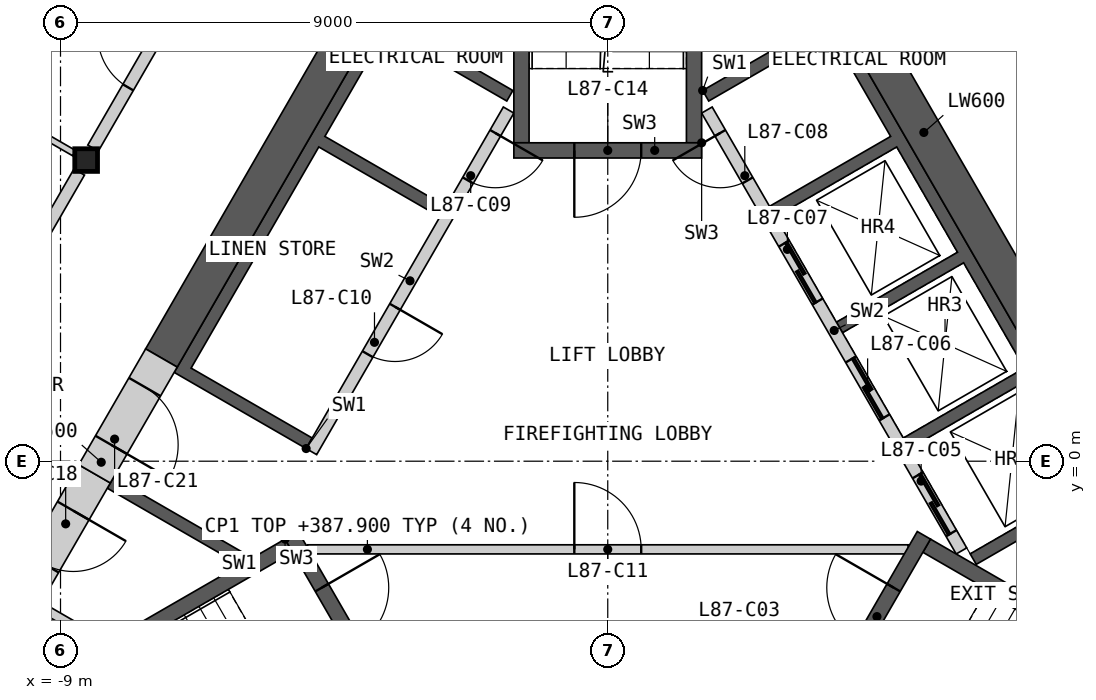
"""IFC4 building model, lengths in metres.
Left out: names, types, materials, properties, quantities, classifications, styles, units other than length and angle.
Written with IfcOpenShell. Run it as: python <this file> out.ifc"""

import sys

from ifc_helpers import new_model, si_unit, direction, frame, frame_2d, origin, origin_2d, place, context, subcontext, project, spatial, polyline, rectangle, i_section, outline, extrude, element, fill, save


model = new_model("IFC4")
c1 = context("Model", 3, precision=1e-05, world=origin(), true_north=direction((0.0, 1.0)))
c2 = subcontext(c1, "Body", "Model", "MODEL_VIEW")
j1 = project(units=[si_unit("LENGTHUNIT", "METRE"), si_unit("PLANEANGLEUNIT", "RADIAN")], contexts=[c1])
p1 = place(None, origin())
s1 = spatial("IfcSite", under=j1, at=p1, CompositionType="ELEMENT")
p2 = place(p1, origin())
s2 = spatial("IfcBuilding", under=s1, at=p2, CompositionType="ELEMENT")
p3 = place(p2, frame((0.0, 0.0, 384.8)))
s3 = spatial("IfcBuildingStorey", under=s2, at=p3, CompositionType="ELEMENT", Elevation=384.8)
p4 = place(p3, frame((-8.578, 4.953, 0.0), z_axis=(0.0, 0.0, 1.0), x_axis=(1.0, 0.0, 0.0)))
e1 = element("IfcColumn", 1, at=p4, inside=s3, PredefinedType="COLUMN", context=c2, shape_type="SweptSolid", body=[
    extrude(i_section(OverallWidth=0.374, OverallDepth=0.372, WebThickness=0.016, FlangeThickness=0.026, at=origin_2d()), origin(), (0.0, 0.0, 1.0), 3.4),
])
p5 = place(p3, origin())
e2 = element("IfcWall", 2, at=p5, inside=s3, PredefinedType="SHEAR", context=c2, shape_type="SweptSolid", body=[
    extrude(outline(polyline([(1.561, 6.097), (3.731, 7.35), (8.231, -0.444), (6.061, -1.697), (5.96, -1.524), (7.952, -0.374), (6.952, 1.358), (4.96, 0.208), (4.861, 0.381), (6.852, 1.531), (5.852, 3.263), (3.861, 2.113), (3.76, 2.287), (5.752, 3.437), (4.752, 5.169), (2.76, 4.019), (2.66, 4.192), (4.652, 5.342), (3.652, 7.074), (1.66, 5.924), (1.561, 6.097)])), origin(), (0.0, 0.0, 1.0), 3.1),
])
p6 = place(p3, frame((5.817, -1.476, 0.0), z_axis=(0.0, 0.0, 1.0), x_axis=(-0.500002616675, 0.866023893041, 0.0)))
e3 = element("IfcWall", 3, at=p6, inside=s3, PredefinedType="SOLIDWALL", context=c2, shape_type="SweptSolid", body=[
    extrude(rectangle(XDim=8.373, YDim=0.2, at=frame_2d((4.187, 0.0))), origin(), (0.0, 0.0, 1.0), 3.1),
])
p7 = place(p6, frame((0.337, 0.0, 0.0)))
e4 = element("IfcOpeningElement", 4, at=p7, cuts=e3, PredefinedType="OPENING", context=c2, shape_type="SweptSolid", body=[
    extrude(rectangle(XDim=1.1, YDim=2.1, at=frame_2d((0.55, 1.05))), frame((0.0, 0.11, 0.0), z_axis=(0.0, -1.0, 0.0), x_axis=(1.0, 0.0, 0.0)), (0.0, 0.0, 1.0), 0.22),
])
p8 = place(p6, frame((2.537, 0.0, 0.0)))
e5 = element("IfcOpeningElement", 5, at=p8, cuts=e3, PredefinedType="OPENING", context=c2, shape_type="SweptSolid", body=[
    extrude(rectangle(XDim=1.1, YDim=2.1, at=frame_2d((0.55, 1.05))), frame((0.0, 0.11, 0.0), z_axis=(0.0, -1.0, 0.0), x_axis=(1.0, 0.0, 0.0)), (0.0, 0.0, 1.0), 0.22),
])
p9 = place(p6, frame((4.737, 0.0, 0.0)))
e6 = element("IfcOpeningElement", 6, at=p9, cuts=e3, PredefinedType="OPENING", context=c2, shape_type="SweptSolid", body=[
    extrude(rectangle(XDim=1.1, YDim=2.1, at=frame_2d((0.55, 1.05))), frame((0.0, 0.11, 0.0), z_axis=(0.0, -1.0, 0.0), x_axis=(1.0, 0.0, 0.0)), (0.0, 0.0, 1.0), 0.22),
])
p10 = place(p6, frame((7.037, 0.0, 0.0)))
e7 = element("IfcOpeningElement", 7, at=p10, cuts=e3, PredefinedType="OPENING", context=c2, shape_type="SweptSolid", body=[
    extrude(rectangle(XDim=0.9, YDim=2.1, at=frame_2d((0.45, 1.05))), frame((0.0, 0.11, 0.0), z_axis=(0.0, -1.0, 0.0), x_axis=(1.0, 0.0, 0.0)), (0.0, 0.0, 1.0), 0.22),
])
p11 = place(p3, origin())
e8 = element("IfcWall", 8, at=p11, inside=s3, PredefinedType="SHEAR", context=c2, shape_type="SweptSolid", body=[
    extrude(outline(polyline([(-6.061, -1.697), (-8.231, -0.444), (-8.131, -0.271), (-5.96, -1.524), (-6.061, -1.697)])), origin(), (0.0, 0.0, 1.0), 3.1),
])
p12 = place(p3, origin())
e9 = element("IfcWall", 9, at=p12, inside=s3, PredefinedType="SHEAR", context=c2, shape_type="SweptSolid", body=[
    extrude(outline(polyline([(-4.96, 0.208), (-7.131, 1.461), (-3.731, 7.35), (-1.561, 6.097), (-1.66, 5.924), (-3.652, 7.074), (-4.652, 5.342), (-2.66, 4.192), (-2.76, 4.019), (-4.752, 5.169), (-6.852, 1.531), (-4.861, 0.381), (-4.96, 0.208)])), origin(), (0.0, 0.0, 1.0), 3.1),
])
p13 = place(p3, frame((-1.631, 5.776, 0.0), z_axis=(0.0, 0.0, 1.0), x_axis=(-0.499992876559, -0.866029516466, 0.0)))
e10 = element("IfcWall", 10, at=p13, inside=s3, PredefinedType="SOLIDWALL", context=c2, shape_type="SweptSolid", body=[
    extrude(rectangle(XDim=6.486, YDim=0.2, at=frame_2d((3.243, 0.0))), origin(), (0.0, 0.0, 1.0), 3.1),
])
p14 = place(p13, frame((0.437, 0.0, 0.0)))
e11 = element("IfcOpeningElement", 11, at=p14, cuts=e10, PredefinedType="OPENING", context=c2, shape_type="SweptSolid", body=[
    extrude(rectangle(XDim=0.9, YDim=2.1, at=frame_2d((0.45, 1.05))), frame((0.0, 0.11, 0.0), z_axis=(0.0, -1.0, 0.0), x_axis=(1.0, 0.0, 0.0)), (0.0, 0.0, 1.0), 0.22),
])
p15 = place(p13, frame((3.737, 0.0, 0.0)))
e12 = element("IfcOpeningElement", 12, at=p15, cuts=e10, PredefinedType="OPENING", context=c2, shape_type="SweptSolid", body=[
    extrude(rectangle(XDim=0.9, YDim=2.1, at=frame_2d((0.45, 1.05))), frame((0.0, 0.11, 0.0), z_axis=(0.0, -1.0, 0.0), x_axis=(1.0, 0.0, 0.0)), (0.0, 0.0, 1.0), 0.22),
])
p16 = place(p3, frame((-4.941, -1.45, 0.0), z_axis=(0.0, 0.0, 1.0), x_axis=(1.0, 0.0, 0.0)))
e13 = element("IfcWall", 13, at=p16, inside=s3, PredefinedType="PARTITIONING", context=c2, shape_type="SweptSolid", body=[
    extrude(rectangle(XDim=9.882, YDim=0.15, at=frame_2d((4.941, 0.0))), origin(), (0.0, 0.0, 1.0), 3.1),
])
p17 = place(p16, frame((4.391, 0.0, 0.0)))
e14 = element("IfcOpeningElement", 14, at=p17, cuts=e13, PredefinedType="OPENING", context=c2, shape_type="SweptSolid", body=[
    extrude(rectangle(XDim=1.1, YDim=2.1, at=frame_2d((0.55, 1.05))), frame((0.0, 0.085, 0.0), z_axis=(0.0, -1.0, 0.0), x_axis=(1.0, 0.0, 0.0)), (0.0, 0.0, 1.0), 0.17),
])
p18 = place(p3, origin())
e15 = element("IfcWall", 15, at=p18, inside=s3, PredefinedType="SHEAR", context=c2, shape_type="SweptSolid", body=[
    extrude(outline(polyline([(-5.307, -1.281), (-10.374, -4.206), (-10.032, -4.298), (-5.182, -1.498), (-5.307, -1.281)])), origin(), (0.0, 0.0, 1.0), 3.1),
])
p19 = place(p3, frame((-5.199, -1.219, 0.0), z_axis=(0.0, 0.0, 1.0), x_axis=(0.499982516597, -0.866035497597, 0.0)))
e16 = element("IfcWall", 16, at=p19, inside=s3, PredefinedType="SHEAR", context=c2, shape_type="SweptSolid", body=[
    extrude(rectangle(XDim=3.088, YDim=0.25, at=frame_2d((1.544, 0.0))), origin(), (0.0, 0.0, 1.0), 3.1),
])
p20 = place(p19, frame((0.994, 0.0, 0.0)))
e17 = element("IfcOpeningElement", 17, at=p20, cuts=e16, PredefinedType="OPENING", context=c2, shape_type="SweptSolid", body=[
    extrude(rectangle(XDim=1.1, YDim=2.1, at=frame_2d((0.55, 1.05))), frame((0.0, 0.135, 0.0), z_axis=(0.0, -1.0, 0.0), x_axis=(1.0, 0.0, 0.0)), (0.0, 0.0, 1.0), 0.27),
])
p21 = place(p3, origin())
e18 = element("IfcWall", 18, at=p21, inside=s3, PredefinedType="SHEAR", context=c2, shape_type="SweptSolid", body=[
    extrude(outline(polyline([(10.032, -4.298), (10.374, -4.206), (5.307, -1.281), (5.182, -1.498), (10.032, -4.298)])), origin(), (0.0, 0.0, 1.0), 3.1),
])
p22 = place(p3, frame((3.655, -3.893, 0.0), z_axis=(0.0, 0.0, 1.0), x_axis=(0.499982516597, 0.866035497597, 0.0)))
e19 = element("IfcWall", 19, at=p22, inside=s3, PredefinedType="SHEAR", context=c2, shape_type="SweptSolid", body=[
    extrude(rectangle(XDim=3.088, YDim=0.25, at=frame_2d((1.544, 0.0))), origin(), (0.0, 0.0, 1.0), 3.1),
])
p23 = place(p22, frame((0.994, 0.0, 0.0)))
e20 = element("IfcOpeningElement", 20, at=p23, cuts=e19, PredefinedType="OPENING", context=c2, shape_type="SweptSolid", body=[
    extrude(rectangle(XDim=1.1, YDim=2.1, at=frame_2d((0.55, 1.05))), frame((0.0, 0.135, 0.0), z_axis=(0.0, -1.0, 0.0), x_axis=(1.0, 0.0, 0.0)), (0.0, 0.0, 1.0), 0.27),
])
p24 = place(p3, origin())
e21 = element("IfcWall", 21, at=p24, inside=s3, PredefinedType="SHEAR", context=c2, shape_type="SweptSolid", body=[
    extrude(outline(polyline([(1.544, 5.237), (1.544, 11.087), (1.294, 10.837), (1.294, 5.237), (1.544, 5.237)])), origin(), (0.0, 0.0, 1.0), 3.1),
])
p25 = place(p3, origin())
e22 = element("IfcWall", 22, at=p25, inside=s3, PredefinedType="SHEAR", context=c2, shape_type="SweptSolid", body=[
    extrude(outline(polyline([(-1.294, 10.837), (-1.544, 11.087), (-1.544, 5.237), (-1.294, 5.237), (-1.294, 10.837)])), origin(), (0.0, 0.0, 1.0), 3.1),
])
p26 = place(p3, frame((1.544, 5.112, 0.0), z_axis=(0.0, 0.0, 1.0), x_axis=(-1.0, 0.0, 0.0)))
e23 = element("IfcWall", 23, at=p26, inside=s3, PredefinedType="SHEAR", context=c2, shape_type="SweptSolid", body=[
    extrude(rectangle(XDim=3.088, YDim=0.25, at=frame_2d((1.544, 0.0))), origin(), (0.0, 0.0, 1.0), 3.1),
])
p27 = place(p26, frame((0.994, 0.0, 0.0)))
e24 = element("IfcOpeningElement", 24, at=p27, cuts=e23, PredefinedType="OPENING", context=c2, shape_type="SweptSolid", body=[
    extrude(rectangle(XDim=1.1, YDim=2.1, at=frame_2d((0.55, 1.05))), frame((0.0, 0.135, 0.0), z_axis=(0.0, -1.0, 0.0), x_axis=(1.0, 0.0, 0.0)), (0.0, 0.0, 1.0), 0.27),
])
p28 = place(p3, frame((-9.35, -2.383, 0.0), z_axis=(0.0, 0.0, 1.0), x_axis=(0.866057962423, -0.499943602543, 0.0)))
e25 = element("IfcWall", 25, at=p28, inside=s3, PredefinedType="PARTITIONING", context=c2, shape_type="SweptSolid", body=[
    extrude(rectangle(XDim=1.242, YDim=0.15, at=frame_2d((0.621, 0.0))), origin(), (0.0, 0.0, 1.0), 3.1),
])
p29 = place(p3, frame((8.841, -0.902, 0.0), z_axis=(0.0, 0.0, 1.0), x_axis=(-0.499995618375, 0.866027933502, 0.0)))
e26 = element("IfcWall", 26, at=p29, inside=s3, PredefinedType="SHEAR", context=c2, shape_type="SweptSolid", body=[
    extrude(rectangle(XDim=14.571, YDim=0.6, at=frame_2d((7.285, 0.0))), origin(), (0.0, 0.0, 1.0), 3.1),
])
p30 = place(p3, frame((-3.639, 8.107, 0.0), z_axis=(0.0, 0.0, 1.0), x_axis=(-0.49999180351, -0.866030135978, 0.0)))
e27 = element("IfcWall", 27, at=p30, inside=s3, PredefinedType="SHEAR", context=c2, shape_type="SweptSolid", body=[
    extrude(rectangle(XDim=7.401, YDim=0.6, at=frame_2d((3.701, 0.0))), origin(), (0.0, 0.0, 1.0), 3.1),
])
p31 = place(p3, frame((-8.44, -0.208, 0.0), z_axis=(0.0, 0.0, 1.0), x_axis=(-0.500001951578, -0.866024277037, 0.0)))
e28 = element("IfcWall", 28, at=p31, inside=s3, PredefinedType="SHEAR", context=c2, shape_type="SweptSolid", body=[
    extrude(rectangle(XDim=2.243, YDim=0.6, at=frame_2d((1.122, 0.0))), origin(), (0.0, 0.0, 1.0), 3.1),
])
p32 = place(p31, frame((0.7, 0.0, 0.0)))
e29 = element("IfcOpeningElement", 29, at=p32, cuts=e28, PredefinedType="OPENING", context=c2, shape_type="SweptSolid", body=[
    extrude(rectangle(XDim=1.0, YDim=2.1, at=frame_2d((0.5, 1.05))), frame((0.0, 0.31, 0.0), z_axis=(0.0, -1.0, 0.0), x_axis=(1.0, 0.0, 0.0)), (0.0, 0.0, 1.0), 0.62),
])
p33 = place(p3, frame((-7.34, 1.698, 0.0), z_axis=(0.0, 0.0, 1.0), x_axis=(-0.50002983664, -0.866008176907, 0.0)))
e30 = element("IfcWall", 30, at=p33, inside=s3, PredefinedType="SHEAR", context=c2, shape_type="SweptSolid", body=[
    extrude(rectangle(XDim=2.2, YDim=0.6, at=frame_2d((1.1, 0.0))), origin(), (0.0, 0.0, 1.0), 3.1),
])
p34 = place(p33, frame((0.55, 0.0, 0.0)))
e31 = element("IfcOpeningElement", 31, at=p34, cuts=e30, PredefinedType="OPENING", context=c2, shape_type="SweptSolid", body=[
    extrude(rectangle(XDim=1.1, YDim=2.1, at=frame_2d((0.55, 1.05))), frame((0.0, 0.31, 0.0), z_axis=(0.0, -1.0, 0.0), x_axis=(1.0, 0.0, 0.0)), (0.0, 0.0, 1.0), 0.62),
])
p35 = place(p3, frame((4.403, 12.185, 0.0), z_axis=(0.0, 0.0, 1.0), x_axis=(0.499992155518, -0.866029932751, 0.0)))
e32 = element("IfcWall", 32, at=p35, inside=s3, PredefinedType="PARTITIONING", context=c2, shape_type="SweptSolid", body=[
    extrude(rectangle(XDim=8.123, YDim=0.2, at=frame_2d((4.062, 0.0))), origin(), (0.0, 0.0, 1.0), 3.1),
])
p36 = place(p35, frame((3.587, 0.0, 0.0)))
e33 = element("IfcOpeningElement", 33, at=p36, cuts=e32, PredefinedType="OPENING", context=c2, shape_type="SweptSolid", body=[
    extrude(rectangle(XDim=0.95, YDim=2.1, at=frame_2d((0.475, 1.05))), frame((0.0, 0.11, 0.0), z_axis=(0.0, -1.0, 0.0), x_axis=(1.0, 0.0, 0.0)), (0.0, 0.0, 1.0), 0.22),
])
p37 = place(p3, frame((-8.465, 5.15, 0.0), z_axis=(0.0, 0.0, 1.0), x_axis=(0.499992155518, 0.866029932751, 0.0)))
e34 = element("IfcWall", 34, at=p37, inside=s3, PredefinedType="PARTITIONING", context=c2, shape_type="SweptSolid", body=[
    extrude(rectangle(XDim=8.123, YDim=0.2, at=frame_2d((4.062, 0.0))), origin(), (0.0, 0.0, 1.0), 3.1),
])
p38 = place(p37, frame((1.153, 0.0, 0.0)))
e35 = element("IfcOpeningElement", 35, at=p38, cuts=e34, PredefinedType="OPENING", context=c2, shape_type="SweptSolid", body=[
    extrude(rectangle(XDim=1.0, YDim=2.1, at=frame_2d((0.5, 1.05))), frame((0.0, 0.11, 0.0), z_axis=(0.0, -1.0, 0.0), x_axis=(1.0, 0.0, 0.0)), (0.0, 0.0, 1.0), 0.22),
])
p39 = place(p3, frame((-12.754, -2.279, 0.0), z_axis=(0.0, 0.0, 1.0), x_axis=(0.500001682468, 0.866024432409, 0.0)))
e36 = element("IfcWall", 36, at=p39, inside=s3, PredefinedType="PARTITIONING", context=c2, shape_type="SweptSolid", body=[
    extrude(rectangle(XDim=8.124, YDim=0.2, at=frame_2d((4.062, 0.0))), origin(), (0.0, 0.0, 1.0), 3.1),
])
p40 = place(p39, frame((1.153, 0.0, 0.0)))
e37 = element("IfcOpeningElement", 37, at=p40, cuts=e36, PredefinedType="OPENING", context=c2, shape_type="SweptSolid", body=[
    extrude(rectangle(XDim=1.0, YDim=2.1, at=frame_2d((0.5, 1.05))), frame((0.0, 0.11, 0.0), z_axis=(0.0, -1.0, 0.0), x_axis=(1.0, 0.0, 0.0)), (0.0, 0.0, 1.0), 0.22),
])
p41 = place(p3, frame((3.926, 19.811, 0.0), z_axis=(0.0, 0.0, 1.0), x_axis=(0.500001082559, -0.866024778768, 0.0)))
e38 = element("IfcWall", 38, at=p41, inside=s3, PredefinedType="PARTITIONING", context=c2, shape_type="SweptSolid", body=[
    extrude(rectangle(XDim=15.094, YDim=0.2, at=frame_2d((7.547, 0.0))), origin(), (0.0, 0.0, 1.0), 2.33),
])
p42 = place(p41, frame((3.761, 0.0, 0.0)))
e39 = element("IfcOpeningElement", 39, at=p42, cuts=e38, PredefinedType="OPENING", context=c2, shape_type="SweptSolid", body=[
    extrude(rectangle(XDim=0.95, YDim=2.1, at=frame_2d((0.475, 1.05))), frame((0.0, 0.11, 0.0), z_axis=(0.0, -1.0, 0.0), x_axis=(1.0, 0.0, 0.0)), (0.0, 0.0, 1.0), 0.22),
])
p43 = place(p3, frame((-18.869, 10.894, 0.0), z_axis=(0.0, 0.0, 1.0), x_axis=(0.866023724155, -0.500002909193, 0.0)))
e40 = element("IfcWall", 40, at=p43, inside=s3, PredefinedType="PARTITIONING", context=c2, shape_type="SweptSolid", body=[
    extrude(rectangle(XDim=11.655, YDim=0.1, at=frame_2d((5.827, 0.0))), origin(), (0.0, 0.0, 1.0), 2.33),
])
p44 = place(p43, frame((6.253, 0.0, 0.0)))
e41 = element("IfcOpeningElement", 41, at=p44, cuts=e40, PredefinedType="OPENING", context=c2, shape_type="SweptSolid", body=[
    extrude(rectangle(XDim=0.95, YDim=2.1, at=frame_2d((0.475, 1.05))), frame((0.0, 0.06, 0.0), z_axis=(0.0, -1.0, 0.0), x_axis=(1.0, 0.0, 0.0)), (0.0, 0.0, 1.0), 0.12),
])
p45 = place(p7, origin())
e42 = element("IfcDoor", 42, at=p45, inside=s3, OperationType="SLIDING_TO_LEFT", PredefinedType="DOOR", context=c2, shape_type="SweptSolid", body=[
    extrude(rectangle(XDim=1.1, YDim=2.1, at=frame_2d((0.55, 1.05))), frame((0.0, 0.025, 0.0), z_axis=(0.0, -1.0, 0.0), x_axis=(1.0, 0.0, 0.0)), (0.0, 0.0, 1.0), 0.05),
])
fill(e4, e42)
p46 = place(p8, origin())
e43 = element("IfcDoor", 43, at=p46, inside=s3, OperationType="SLIDING_TO_LEFT", PredefinedType="DOOR", context=c2, shape_type="SweptSolid", body=[
    extrude(rectangle(XDim=1.1, YDim=2.1, at=frame_2d((0.55, 1.05))), frame((0.0, 0.025, 0.0), z_axis=(0.0, -1.0, 0.0), x_axis=(1.0, 0.0, 0.0)), (0.0, 0.0, 1.0), 0.05),
])
fill(e5, e43)
p47 = place(p9, origin())
e44 = element("IfcDoor", 44, at=p47, inside=s3, OperationType="SLIDING_TO_LEFT", PredefinedType="DOOR", context=c2, shape_type="SweptSolid", body=[
    extrude(rectangle(XDim=1.1, YDim=2.1, at=frame_2d((0.55, 1.05))), frame((0.0, 0.025, 0.0), z_axis=(0.0, -1.0, 0.0), x_axis=(1.0, 0.0, 0.0)), (0.0, 0.0, 1.0), 0.05),
])
fill(e6, e44)
p48 = place(p10, origin())
e45 = element("IfcDoor", 45, at=p48, inside=s3, OperationType="SINGLE_SWING_RIGHT", PredefinedType="DOOR", context=c2, shape_type="SweptSolid", body=[
    extrude(rectangle(XDim=0.9, YDim=2.1, at=frame_2d((0.45, 1.05))), frame((0.0, 0.025, 0.0), z_axis=(0.0, -1.0, 0.0), x_axis=(1.0, 0.0, 0.0)), (0.0, 0.0, 1.0), 0.05),
])
fill(e7, e45)
p49 = place(p14, origin())
e46 = element("IfcDoor", 46, at=p49, inside=s3, OperationType="SINGLE_SWING_LEFT", PredefinedType="DOOR", context=c2, shape_type="SweptSolid", body=[
    extrude(rectangle(XDim=0.9, YDim=2.1, at=frame_2d((0.45, 1.05))), frame((0.0, 0.025, 0.0), z_axis=(0.0, -1.0, 0.0), x_axis=(1.0, 0.0, 0.0)), (0.0, 0.0, 1.0), 0.05),
])
fill(e11, e46)
p50 = place(p15, origin())
e47 = element("IfcDoor", 47, at=p50, inside=s3, OperationType="SINGLE_SWING_LEFT", PredefinedType="DOOR", context=c2, shape_type="SweptSolid", body=[
    extrude(rectangle(XDim=0.9, YDim=2.1, at=frame_2d((0.45, 1.05))), frame((0.0, 0.025, 0.0), z_axis=(0.0, -1.0, 0.0), x_axis=(1.0, 0.0, 0.0)), (0.0, 0.0, 1.0), 0.05),
])
fill(e12, e47)
p51 = place(p17, origin())
e48 = element("IfcDoor", 48, at=p51, inside=s3, OperationType="SINGLE_SWING_LEFT", PredefinedType="DOOR", context=c2, shape_type="SweptSolid", body=[
    extrude(rectangle(XDim=1.1, YDim=2.1, at=frame_2d((0.55, 1.05))), frame((0.0, 0.025, 0.0), z_axis=(0.0, -1.0, 0.0), x_axis=(1.0, 0.0, 0.0)), (0.0, 0.0, 1.0), 0.05),
])
fill(e14, e48)
p52 = place(p20, origin())
e49 = element("IfcDoor", 49, at=p52, inside=s3, OperationType="SINGLE_SWING_LEFT", PredefinedType="DOOR", context=c2, shape_type="SweptSolid", body=[
    extrude(rectangle(XDim=1.1, YDim=2.1, at=frame_2d((0.55, 1.05))), frame((0.0, 0.025, 0.0), z_axis=(0.0, -1.0, 0.0), x_axis=(1.0, 0.0, 0.0)), (0.0, 0.0, 1.0), 0.05),
])
fill(e17, e49)
p53 = place(p23, origin())
e50 = element("IfcDoor", 50, at=p53, inside=s3, OperationType="SINGLE_SWING_RIGHT", PredefinedType="DOOR", context=c2, shape_type="SweptSolid", body=[
    extrude(rectangle(XDim=1.1, YDim=2.1, at=frame_2d((0.55, 1.05))), frame((0.0, 0.025, 0.0), z_axis=(0.0, -1.0, 0.0), x_axis=(1.0, 0.0, 0.0)), (0.0, 0.0, 1.0), 0.05),
])
fill(e20, e50)
p54 = place(p27, origin())
e51 = element("IfcDoor", 51, at=p54, inside=s3, OperationType="SINGLE_SWING_RIGHT", PredefinedType="DOOR", context=c2, shape_type="SweptSolid", body=[
    extrude(rectangle(XDim=1.1, YDim=2.1, at=frame_2d((0.55, 1.05))), frame((0.0, 0.025, 0.0), z_axis=(0.0, -1.0, 0.0), x_axis=(1.0, 0.0, 0.0)), (0.0, 0.0, 1.0), 0.05),
])
fill(e24, e51)
p55 = place(p32, origin())
e52 = element("IfcDoor", 52, at=p55, inside=s3, OperationType="SINGLE_SWING_LEFT", PredefinedType="DOOR", context=c2, shape_type="SweptSolid", body=[
    extrude(rectangle(XDim=1.0, YDim=2.1, at=frame_2d((0.5, 1.05))), frame((0.0, 0.055, 0.0), z_axis=(0.0, -1.0, 0.0), x_axis=(1.0, 0.0, 0.0)), (0.0, 0.0, 1.0), 0.05),
])
fill(e29, e52)
p56 = place(p34, origin())
e53 = element("IfcDoor", 53, at=p56, inside=s3, OperationType="SINGLE_SWING_RIGHT", PredefinedType="DOOR", context=c2, shape_type="SweptSolid", body=[
    extrude(rectangle(XDim=1.1, YDim=2.1, at=frame_2d((0.55, 1.05))), frame((0.0, 0.055, 0.0), z_axis=(0.0, -1.0, 0.0), x_axis=(1.0, 0.0, 0.0)), (0.0, 0.0, 1.0), 0.05),
])
fill(e31, e53)
p57 = place(p38, origin())
e54 = element("IfcDoor", 54, at=p57, inside=s3, OperationType="SINGLE_SWING_RIGHT", PredefinedType="DOOR", context=c2, shape_type="SweptSolid", body=[
    extrude(rectangle(XDim=1.0, YDim=2.1, at=frame_2d((0.5, 1.05))), frame((0.0, 0.025, 0.0), z_axis=(0.0, -1.0, 0.0), x_axis=(1.0, 0.0, 0.0)), (0.0, 0.0, 1.0), 0.05),
])
fill(e35, e54)
save(model, sys.argv[1])
